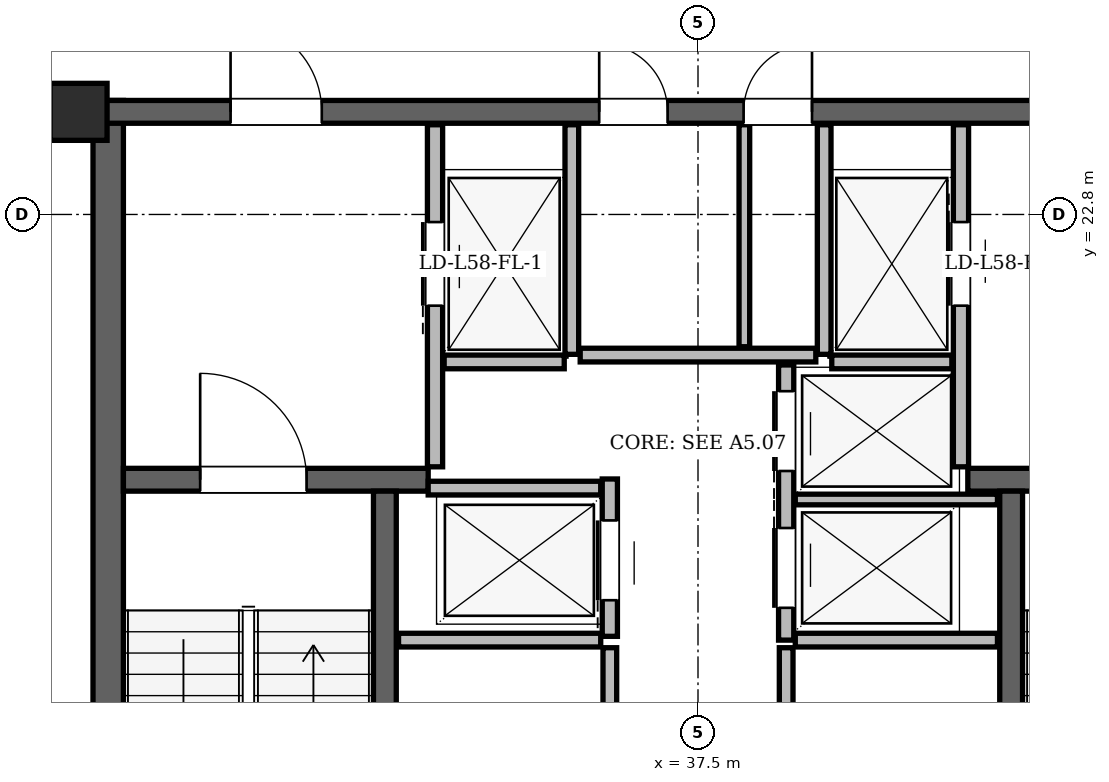
"""IFC4 building model, lengths in metres.
Left out: names, types, materials, properties, quantities, classifications, styles, units other than length and angle.
Written with IfcOpenShell. Run it as: python <this file> out.ifc"""

import sys

from ifc_helpers import new_model, si_unit, direction, frame, frame_2d, origin, origin_2d, place, context, subcontext, project, spatial, rectangle, hollow_rectangle, extrude, element, fill, save


model = new_model("IFC4")
c1 = context("Model", 3, precision=1e-05, world=origin(), true_north=direction((0.0, 1.0)))
c2 = subcontext(c1, "Body", "Model", "MODEL_VIEW")
j1 = project(units=[si_unit("LENGTHUNIT", "METRE"), si_unit("PLANEANGLEUNIT", "RADIAN")], contexts=[c1])
p1 = place(None, origin())
s1 = spatial("IfcSite", under=j1, at=p1, CompositionType="ELEMENT")
p2 = place(p1, origin())
s2 = spatial("IfcBuilding", under=s1, at=p2, CompositionType="ELEMENT")
p3 = place(p2, frame((0.0, 0.0, 219.9)))
s3 = spatial("IfcBuildingStorey", under=s2, at=p3, CompositionType="ELEMENT", Elevation=219.9)
p4 = place(p3, frame((29.35, 24.15, 0.0), z_axis=(0.0, 0.0, 1.0), x_axis=(1.0, 0.0, 0.0)))
e1 = element("IfcColumn", 1, at=p4, inside=s3, PredefinedType="COLUMN", context=c2, shape_type="SweptSolid", body=[
    extrude(hollow_rectangle(XDim=0.75, YDim=0.75, WallThickness=0.06, at=origin_2d()), origin(), (0.0, 0.0, 1.0), 3.6),
])
p5 = place(p3, frame((29.74, 11.0, 0.0), z_axis=(0.0, 0.0, 1.0), x_axis=(0.0, 1.0, 0.0)))
e2 = element("IfcWall", 2, at=p5, inside=s3, PredefinedType="SHEAR", context=c2, shape_type="SweptSolid", body=[
    extrude(rectangle(XDim=13.3, YDim=0.4, at=frame_2d((6.65, 0.0))), origin(), (0.0, 0.0, 1.0), 3.38),
])
p6 = place(p3, frame((29.65, 24.15, 0.0), z_axis=(0.0, 0.0, 1.0), x_axis=(1.0, 0.0, 0.0)))
e3 = element("IfcWall", 3, at=p6, inside=s3, PredefinedType="SHEAR", context=c2, shape_type="SweptSolid", body=[
    extrude(rectangle(XDim=15.7, YDim=0.3, at=frame_2d((7.85, 0.0))), origin(), (0.0, 0.0, 1.0), 3.38),
])
p7 = place(p6, frame((1.7, 0.0, 0.0)))
e4 = element("IfcOpeningElement", 4, at=p7, cuts=e3, PredefinedType="OPENING", context=c2, shape_type="SweptSolid", body=[
    extrude(rectangle(XDim=1.2, YDim=2.2, at=frame_2d((0.6, 1.1))), frame((0.0, 0.15, 0.0), z_axis=(0.0, -1.0, 0.0), x_axis=(1.0, 0.0, 0.0)), (0.0, 0.0, 1.0), 0.3),
])
p8 = place(p6, frame((12.8, 0.0, 0.0)))
e5 = element("IfcOpeningElement", 5, at=p8, cuts=e3, PredefinedType="OPENING", context=c2, shape_type="SweptSolid", body=[
    extrude(rectangle(XDim=1.2, YDim=2.2, at=frame_2d((0.6, 1.1))), frame((0.0, 0.15, 0.0), z_axis=(0.0, -1.0, 0.0), x_axis=(1.0, 0.0, 0.0)), (0.0, 0.0, 1.0), 0.3),
])
p9 = place(p6, frame((6.55, 0.0, 0.0)))
e6 = element("IfcOpeningElement", 6, at=p9, cuts=e3, PredefinedType="OPENING", context=c2, shape_type="SweptSolid", body=[
    extrude(rectangle(XDim=0.9, YDim=2.05, at=frame_2d((0.45, 1.025))), frame((0.0, 0.15, 0.0), z_axis=(0.0, -1.0, 0.0), x_axis=(1.0, 0.0, 0.0)), (0.0, 0.0, 1.0), 0.3),
])
p10 = place(p6, frame((8.45, 0.0, 0.0)))
e7 = element("IfcOpeningElement", 7, at=p10, cuts=e3, PredefinedType="OPENING", context=c2, shape_type="SweptSolid", body=[
    extrude(rectangle(XDim=0.9, YDim=2.05, at=frame_2d((0.45, 1.025))), frame((0.0, 0.15, 0.0), z_axis=(0.0, -1.0, 0.0), x_axis=(1.0, 0.0, 0.0)), (0.0, 0.0, 1.0), 0.3),
])
p11 = place(p3, frame((29.94, 19.31, 0.0), z_axis=(0.0, 0.0, 1.0), x_axis=(1.0, 0.0, 0.0)))
e8 = element("IfcWall", 8, at=p11, inside=s3, PredefinedType="SHEAR", context=c2, shape_type="SweptSolid", body=[
    extrude(rectangle(XDim=4.01, YDim=0.3, at=frame_2d((2.005, 0.0))), origin(), (0.0, 0.0, 1.0), 3.38),
])
p12 = place(p11, frame((1.01, 0.0, 0.0)))
e9 = element("IfcOpeningElement", 9, at=p12, cuts=e8, PredefinedType="OPENING", context=c2, shape_type="SweptSolid", body=[
    extrude(rectangle(XDim=1.4, YDim=2.2, at=frame_2d((0.7, 1.1))), frame((0.0, 0.15, 0.0), z_axis=(0.0, -1.0, 0.0), x_axis=(1.0, 0.0, 0.0)), (0.0, 0.0, 1.0), 0.3),
])
p13 = place(p3, frame((41.05, 19.31, 0.0), z_axis=(0.0, 0.0, 1.0), x_axis=(1.0, 0.0, 0.0)))
e10 = element("IfcWall", 10, at=p13, inside=s3, PredefinedType="SHEAR", context=c2, shape_type="SweptSolid", body=[
    extrude(rectangle(XDim=4.01, YDim=0.3, at=frame_2d((2.005, 0.0))), origin(), (0.0, 0.0, 1.0), 3.38),
])
p14 = place(p13, frame((1.6, 0.0, 0.0)))
e11 = element("IfcOpeningElement", 11, at=p14, cuts=e10, PredefinedType="OPENING", context=c2, shape_type="SweptSolid", body=[
    extrude(rectangle(XDim=1.4, YDim=2.2, at=frame_2d((0.7, 1.1))), frame((0.0, 0.15, 0.0), z_axis=(0.0, -1.0, 0.0), x_axis=(1.0, 0.0, 0.0)), (0.0, 0.0, 1.0), 0.3),
])
for number, where, z_axis, x_axis in (
    (12, (33.38, 11.54, 0.0), (0.0, 0.0, 1.0), (0.0, 1.0, 0.0)),
    (13, (41.62, 11.54, 0.0), (0.0, 0.0, 1.0), (0.0, 1.0, 0.0)),
):
    element("IfcWall", number, at=place(p3, frame(where, z_axis=z_axis, x_axis=x_axis)), inside=s3, PredefinedType="SHEAR", context=c2, shape_type="SweptSolid", body=[
        extrude(rectangle(XDim=7.62, YDim=0.3, at=frame_2d((3.81, 0.0))), origin(), (0.0, 0.0, 1.0), 3.38),
    ])
p15 = place(p3, frame((59.113, 11.428, 0.0), z_axis=(0.0, 0.0, 1.0), x_axis=(-0.499994551211, 0.866028549621, 0.0)))
e14 = element("IfcWall", 14, at=p15, inside=s3, PredefinedType="SOLIDWALL", context=c2, shape_type="SweptSolid", body=[
    extrude(rectangle(XDim=36.634, YDim=0.29, at=frame_2d((18.317, 0.0))), origin(), (0.0, 0.0, 1.0), 2.677),
])
p16 = place(p15, frame((3.429, 0.0, 0.0)))
e15 = element("IfcOpeningElement", 15, at=p16, cuts=e14, PredefinedType="OPENING", context=c2, shape_type="SweptSolid", body=[
    extrude(rectangle(XDim=1.5, YDim=2.2, at=frame_2d((0.75, 1.1))), frame((0.0, 0.145, 0.0), z_axis=(0.0, -1.0, 0.0), x_axis=(1.0, 0.0, 0.0)), (0.0, 0.0, 1.0), 0.29),
])
p17 = place(p15, frame((27.099, 0.0, 0.0)))
e16 = element("IfcOpeningElement", 16, at=p17, cuts=e14, PredefinedType="OPENING", context=c2, shape_type="SweptSolid", body=[
    extrude(rectangle(XDim=1.5, YDim=2.2, at=frame_2d((0.75, 1.1))), frame((0.0, 0.145, 0.0), z_axis=(0.0, -1.0, 0.0), x_axis=(1.0, 0.0, 0.0)), (0.0, 0.0, 1.0), 0.29),
])
p18 = place(p15, frame((7.895, 0.0, 0.85)))
e17 = element("IfcOpeningElement", 17, at=p18, cuts=e14, PredefinedType="OPENING", context=c2, shape_type="SweptSolid", body=[
    extrude(rectangle(XDim=1.2, YDim=1.48, at=frame_2d((0.6, 0.74))), frame((0.0, 0.145, 0.0), z_axis=(0.0, -1.0, 0.0), x_axis=(1.0, 0.0, 0.0)), (0.0, 0.0, 1.0), 0.29),
])
p19 = place(p15, frame((1.262, 0.0, 0.85)))
e18 = element("IfcOpeningElement", 18, at=p19, cuts=e14, PredefinedType="OPENING", context=c2, shape_type="SweptSolid", body=[
    extrude(rectangle(XDim=1.2, YDim=1.48, at=frame_2d((0.6, 0.74))), frame((0.0, 0.145, 0.0), z_axis=(0.0, -1.0, 0.0), x_axis=(1.0, 0.0, 0.0)), (0.0, 0.0, 1.0), 0.29),
])
p20 = place(p15, frame((12.216, 0.0, 0.85)))
e19 = element("IfcOpeningElement", 19, at=p20, cuts=e14, PredefinedType="OPENING", context=c2, shape_type="SweptSolid", body=[
    extrude(rectangle(XDim=2.0, YDim=1.717, at=frame_2d((1.0, 0.858))), frame((0.0, 0.145, 0.0), z_axis=(0.0, -1.0, 0.0), x_axis=(1.0, 0.0, 0.0)), (0.0, 0.0, 1.0), 0.29),
])
p21 = place(p15, frame((17.285, 0.0, 0.85)))
e20 = element("IfcOpeningElement", 20, at=p21, cuts=e14, PredefinedType="OPENING", context=c2, shape_type="SweptSolid", body=[
    extrude(rectangle(XDim=1.4, YDim=1.6, at=frame_2d((0.7, 0.8))), frame((0.0, 0.145, 0.0), z_axis=(0.0, -1.0, 0.0), x_axis=(1.0, 0.0, 0.0)), (0.0, 0.0, 1.0), 0.29),
])
p22 = place(p15, frame((20.673, 0.0, 0.85)))
e21 = element("IfcOpeningElement", 21, at=p22, cuts=e14, PredefinedType="OPENING", context=c2, shape_type="SweptSolid", body=[
    extrude(rectangle(XDim=1.2, YDim=1.48, at=frame_2d((0.6, 0.74))), frame((0.0, 0.145, 0.0), z_axis=(0.0, -1.0, 0.0), x_axis=(1.0, 0.0, 0.0)), (0.0, 0.0, 1.0), 0.29),
])
p23 = place(p15, frame((34.257, 0.0, 0.85)))
e22 = element("IfcOpeningElement", 22, at=p23, cuts=e14, PredefinedType="OPENING", context=c2, shape_type="SweptSolid", body=[
    extrude(rectangle(XDim=1.2, YDim=1.48, at=frame_2d((0.6, 0.74))), frame((0.0, 0.145, 0.0), z_axis=(0.0, -1.0, 0.0), x_axis=(1.0, 0.0, 0.0)), (0.0, 0.0, 1.0), 0.29),
])
p24 = place(p3, frame((34.203, 43.154, 0.0), z_axis=(0.0, 0.0, 1.0), x_axis=(-0.499994551211, -0.866028549621, 0.0)))
e23 = element("IfcWall", 23, at=p24, inside=s3, PredefinedType="SOLIDWALL", context=c2, shape_type="SweptSolid", body=[
    extrude(rectangle(XDim=36.634, YDim=0.29, at=frame_2d((18.317, 0.0))), origin(), (0.0, 0.0, 1.0), 2.677),
])
p25 = place(p24, frame((3.429, 0.0, 0.0)))
e24 = element("IfcOpeningElement", 24, at=p25, cuts=e23, PredefinedType="OPENING", context=c2, shape_type="SweptSolid", body=[
    extrude(rectangle(XDim=1.5, YDim=2.2, at=frame_2d((0.75, 1.1))), frame((0.0, 0.145, 0.0), z_axis=(0.0, -1.0, 0.0), x_axis=(1.0, 0.0, 0.0)), (0.0, 0.0, 1.0), 0.29),
])
p26 = place(p24, frame((27.099, 0.0, 0.0)))
e25 = element("IfcOpeningElement", 25, at=p26, cuts=e23, PredefinedType="OPENING", context=c2, shape_type="SweptSolid", body=[
    extrude(rectangle(XDim=1.5, YDim=2.2, at=frame_2d((0.75, 1.1))), frame((0.0, 0.145, 0.0), z_axis=(0.0, -1.0, 0.0), x_axis=(1.0, 0.0, 0.0)), (0.0, 0.0, 1.0), 0.29),
])
p27 = place(p24, frame((22.904, 0.0, 0.85)))
e26 = element("IfcOpeningElement", 26, at=p27, cuts=e23, PredefinedType="OPENING", context=c2, shape_type="SweptSolid", body=[
    extrude(rectangle(XDim=1.2, YDim=1.48, at=frame_2d((0.6, 0.74))), frame((0.0, 0.145, 0.0), z_axis=(0.0, -1.0, 0.0), x_axis=(1.0, 0.0, 0.0)), (0.0, 0.0, 1.0), 0.29),
])
p28 = place(p24, frame((33.102, 0.0, 0.85)))
e27 = element("IfcOpeningElement", 27, at=p28, cuts=e23, PredefinedType="OPENING", context=c2, shape_type="SweptSolid", body=[
    extrude(rectangle(XDim=1.2, YDim=1.48, at=frame_2d((0.6, 0.74))), frame((0.0, 0.145, 0.0), z_axis=(0.0, -1.0, 0.0), x_axis=(1.0, 0.0, 0.0)), (0.0, 0.0, 1.0), 0.29),
])
p29 = place(p24, frame((8.475, 0.0, 0.85)))
e28 = element("IfcOpeningElement", 28, at=p29, cuts=e23, PredefinedType="OPENING", context=c2, shape_type="SweptSolid", body=[
    extrude(rectangle(XDim=1.2, YDim=1.48, at=frame_2d((0.6, 0.74))), frame((0.0, 0.145, 0.0), z_axis=(0.0, -1.0, 0.0), x_axis=(1.0, 0.0, 0.0)), (0.0, 0.0, 1.0), 0.29),
])
p30 = place(p24, frame((15.529, 0.0, 0.85)))
e29 = element("IfcOpeningElement", 29, at=p30, cuts=e23, PredefinedType="OPENING", context=c2, shape_type="SweptSolid", body=[
    extrude(rectangle(XDim=2.8, YDim=1.717, at=frame_2d((1.4, 0.858))), frame((0.0, 0.145, 0.0), z_axis=(0.0, -1.0, 0.0), x_axis=(1.0, 0.0, 0.0)), (0.0, 0.0, 1.0), 0.29),
])
p31 = place(p24, frame((1.5, 0.0, 0.85)))
e30 = element("IfcOpeningElement", 30, at=p31, cuts=e23, PredefinedType="OPENING", context=c2, shape_type="SweptSolid", body=[
    extrude(rectangle(XDim=1.2, YDim=1.48, at=frame_2d((0.6, 0.74))), frame((0.0, 0.145, 0.0), z_axis=(0.0, -1.0, 0.0), x_axis=(1.0, 0.0, 0.0)), (0.0, 0.0, 1.0), 0.29),
])
p32 = place(p3, frame((34.04, 19.48, 0.0), z_axis=(0.0, 0.0, 1.0), x_axis=(0.0, 1.0, 0.0)))
e31 = element("IfcWall", 31, at=p32, inside=s3, PredefinedType="PARTITIONING", context=c2, shape_type="SweptSolid", body=[
    extrude(rectangle(XDim=4.5, YDim=0.2, at=frame_2d((2.25, 0.0))), origin(), (0.0, 0.0, 1.0), 3.38),
])
p33 = place(p32, frame((2.12, 0.0, 0.0)))
e32 = element("IfcOpeningElement", 32, at=p33, cuts=e31, PredefinedType="OPENING", context=c2, shape_type="SweptSolid", body=[
    extrude(rectangle(XDim=1.1, YDim=2.2, at=frame_2d((0.55, 1.1))), frame((0.0, 0.1, 0.0), z_axis=(0.0, -1.0, 0.0), x_axis=(1.0, 0.0, 0.0)), (0.0, 0.0, 1.0), 0.2),
])
p34 = place(p3, frame((35.84, 20.96, 0.0), z_axis=(0.0, 0.0, 1.0), x_axis=(0.0, 1.0, 0.0)))
e33 = element("IfcWall", 33, at=p34, inside=s3, PredefinedType="PARTITIONING", context=c2, shape_type="SweptSolid", body=[
    extrude(rectangle(XDim=3.02, YDim=0.18, at=frame_2d((1.51, 0.0))), origin(), (0.0, 0.0, 1.0), 3.38),
])
p35 = place(p3, frame((34.16, 20.86, 0.0), z_axis=(0.0, 0.0, 1.0), x_axis=(1.0, 0.0, 0.0)))
e34 = element("IfcWall", 34, at=p35, inside=s3, PredefinedType="PARTITIONING", context=c2, shape_type="SweptSolid", body=[
    extrude(rectangle(XDim=1.58, YDim=0.18, at=frame_2d((0.79, 0.0))), origin(), (0.0, 0.0, 1.0), 3.38),
])
p36 = place(p3, frame((40.96, 19.48, 0.0), z_axis=(0.0, 0.0, 1.0), x_axis=(0.0, 1.0, 0.0)))
e35 = element("IfcWall", 35, at=p36, inside=s3, PredefinedType="PARTITIONING", context=c2, shape_type="SweptSolid", body=[
    extrude(rectangle(XDim=4.5, YDim=0.2, at=frame_2d((2.25, 0.0))), origin(), (0.0, 0.0, 1.0), 3.38),
])
p37 = place(p36, frame((2.12, 0.0, 0.0)))
e36 = element("IfcOpeningElement", 36, at=p37, cuts=e35, PredefinedType="OPENING", context=c2, shape_type="SweptSolid", body=[
    extrude(rectangle(XDim=1.1, YDim=2.2, at=frame_2d((0.55, 1.1))), frame((0.0, 0.1, 0.0), z_axis=(0.0, -1.0, 0.0), x_axis=(1.0, 0.0, 0.0)), (0.0, 0.0, 1.0), 0.2),
])
p38 = place(p3, frame((39.16, 20.96, 0.0), z_axis=(0.0, 0.0, 1.0), x_axis=(0.0, 1.0, 0.0)))
e37 = element("IfcWall", 37, at=p38, inside=s3, PredefinedType="PARTITIONING", context=c2, shape_type="SweptSolid", body=[
    extrude(rectangle(XDim=3.02, YDim=0.18, at=frame_2d((1.51, 0.0))), origin(), (0.0, 0.0, 1.0), 3.38),
])
p39 = place(p3, frame((39.26, 20.86, 0.0), z_axis=(0.0, 0.0, 1.0), x_axis=(1.0, 0.0, 0.0)))
e38 = element("IfcWall", 38, at=p39, inside=s3, PredefinedType="PARTITIONING", context=c2, shape_type="SweptSolid", body=[
    extrude(rectangle(XDim=1.58, YDim=0.18, at=frame_2d((0.79, 0.0))), origin(), (0.0, 0.0, 1.0), 3.38),
])
p40 = place(p3, frame((36.34, 17.25, 0.0), z_axis=(0.0, 0.0, 1.0), x_axis=(0.0, 1.0, 0.0)))
e39 = element("IfcWall", 39, at=p40, inside=s3, PredefinedType="PARTITIONING", context=c2, shape_type="SweptSolid", body=[
    extrude(rectangle(XDim=2.07, YDim=0.2, at=frame_2d((1.035, 0.0))), origin(), (0.0, 0.0, 1.0), 3.38),
])
p41 = place(p40, frame((0.475, 0.0, 0.0)))
e40 = element("IfcOpeningElement", 40, at=p41, cuts=e39, PredefinedType="OPENING", context=c2, shape_type="SweptSolid", body=[
    extrude(rectangle(XDim=1.05, YDim=2.15, at=frame_2d((0.525, 1.075))), frame((0.0, 0.1, 0.0), z_axis=(0.0, -1.0, 0.0), x_axis=(1.0, 0.0, 0.0)), (0.0, 0.0, 1.0), 0.2),
])
p42 = place(p3, frame((33.95, 19.2, 0.0), z_axis=(0.0, 0.0, 1.0), x_axis=(1.0, 0.0, 0.0)))
e41 = element("IfcWall", 41, at=p42, inside=s3, PredefinedType="PARTITIONING", context=c2, shape_type="SweptSolid", body=[
    extrude(rectangle(XDim=2.27, YDim=0.18, at=frame_2d((1.135, 0.0))), origin(), (0.0, 0.0, 1.0), 3.38),
])
p43 = place(p3, frame((33.56, 17.2, 0.0), z_axis=(0.0, 0.0, 1.0), x_axis=(1.0, 0.0, 0.0)))
e42 = element("IfcWall", 42, at=p43, inside=s3, PredefinedType="PARTITIONING", context=c2, shape_type="SweptSolid", body=[
    extrude(rectangle(XDim=2.66, YDim=0.18, at=frame_2d((1.33, 0.0))), origin(), (0.0, 0.0, 1.0), 3.38),
])
p44 = place(p3, frame((36.34, 11.55, 0.0), z_axis=(0.0, 0.0, 1.0), x_axis=(0.0, 1.0, 0.0)))
e43 = element("IfcWall", 43, at=p44, inside=s3, PredefinedType="PARTITIONING", context=c2, shape_type="SweptSolid", body=[
    extrude(rectangle(XDim=5.55, YDim=0.18, at=frame_2d((2.775, 0.0))), origin(), (0.0, 0.0, 1.0), 3.38),
])
p45 = place(p44, frame((2.85, 0.0, 0.0)))
e44 = element("IfcOpeningElement", 44, at=p45, cuts=e43, PredefinedType="OPENING", context=c2, shape_type="SweptSolid", body=[
    extrude(rectangle(XDim=0.95, YDim=2.1, at=frame_2d((0.475, 1.05))), frame((0.0, 0.09, 0.0), z_axis=(0.0, -1.0, 0.0), x_axis=(1.0, 0.0, 0.0)), (0.0, 0.0, 1.0), 0.18),
])
p46 = place(p3, frame((38.66, 17.2, 0.0), z_axis=(0.0, 0.0, 1.0), x_axis=(0.0, 1.0, 0.0)))
e45 = element("IfcWall", 45, at=p46, inside=s3, PredefinedType="PARTITIONING", context=c2, shape_type="SweptSolid", body=[
    extrude(rectangle(XDim=3.62, YDim=0.2, at=frame_2d((1.81, 0.0))), origin(), (0.0, 0.0, 1.0), 3.38),
])
p47 = place(p46, frame((0.425, 0.0, 0.0)))
e46 = element("IfcOpeningElement", 46, at=p47, cuts=e45, PredefinedType="OPENING", context=c2, shape_type="SweptSolid", body=[
    extrude(rectangle(XDim=1.05, YDim=2.15, at=frame_2d((0.525, 1.075))), frame((0.0, 0.1, 0.0), z_axis=(0.0, -1.0, 0.0), x_axis=(1.0, 0.0, 0.0)), (0.0, 0.0, 1.0), 0.2),
])
p48 = place(p46, frame((2.225, 0.0, 0.0)))
e47 = element("IfcOpeningElement", 47, at=p48, cuts=e45, PredefinedType="OPENING", context=c2, shape_type="SweptSolid", body=[
    extrude(rectangle(XDim=1.05, YDim=2.15, at=frame_2d((0.525, 1.075))), frame((0.0, 0.1, 0.0), z_axis=(0.0, -1.0, 0.0), x_axis=(1.0, 0.0, 0.0)), (0.0, 0.0, 1.0), 0.2),
])
p49 = place(p3, frame((38.78, 17.2, 0.0), z_axis=(0.0, 0.0, 1.0), x_axis=(1.0, 0.0, 0.0)))
e48 = element("IfcWall", 48, at=p49, inside=s3, PredefinedType="PARTITIONING", context=c2, shape_type="SweptSolid", body=[
    extrude(rectangle(XDim=2.66, YDim=0.18, at=frame_2d((1.33, 0.0))), origin(), (0.0, 0.0, 1.0), 3.38),
])
p50 = place(p3, frame((38.78, 19.05, 0.0), z_axis=(0.0, 0.0, 1.0), x_axis=(1.0, 0.0, 0.0)))
e49 = element("IfcWall", 49, at=p50, inside=s3, PredefinedType="PARTITIONING", context=c2, shape_type="SweptSolid", body=[
    extrude(rectangle(XDim=2.66, YDim=0.14, at=frame_2d((1.33, 0.0))), origin(), (0.0, 0.0, 1.0), 3.38),
])
p51 = place(p3, frame((38.66, 11.55, 0.0), z_axis=(0.0, 0.0, 1.0), x_axis=(0.0, 1.0, 0.0)))
e50 = element("IfcWall", 50, at=p51, inside=s3, PredefinedType="PARTITIONING", context=c2, shape_type="SweptSolid", body=[
    extrude(rectangle(XDim=5.55, YDim=0.18, at=frame_2d((2.775, 0.0))), origin(), (0.0, 0.0, 1.0), 3.38),
])
p52 = place(p51, frame((3.15, 0.0, 0.0)))
e51 = element("IfcOpeningElement", 51, at=p52, cuts=e50, PredefinedType="OPENING", context=c2, shape_type="SweptSolid", body=[
    extrude(rectangle(XDim=0.95, YDim=2.1, at=frame_2d((0.475, 1.05))), frame((0.0, 0.09, 0.0), z_axis=(0.0, -1.0, 0.0), x_axis=(1.0, 0.0, 0.0)), (0.0, 0.0, 1.0), 0.18),
])
p53 = place(p3, frame((35.95, 20.95, 0.0), z_axis=(0.0, 0.0, 1.0), x_axis=(1.0, 0.0, 0.0)))
e52 = element("IfcWall", 52, at=p53, inside=s3, PredefinedType="PARTITIONING", context=c2, shape_type="SweptSolid", body=[
    extrude(rectangle(XDim=3.1, YDim=0.18, at=frame_2d((1.55, 0.0))), origin(), (0.0, 0.0, 1.0), 3.38),
])
p54 = place(p3, frame((38.11, 21.06, 0.0), z_axis=(0.0, 0.0, 1.0), x_axis=(0.0, 1.0, 0.0)))
e53 = element("IfcWall", 53, at=p54, inside=s3, PredefinedType="PARTITIONING", context=c2, shape_type="SweptSolid", body=[
    extrude(rectangle(XDim=2.92, YDim=0.14, at=frame_2d((1.46, 0.0))), origin(), (0.0, 0.0, 1.0), 3.38),
])
p55 = place(p33, origin())
e54 = element("IfcDoor", 54, at=p55, inside=s3, OperationType="SLIDING_TO_LEFT", PredefinedType="DOOR", context=c2, shape_type="SweptSolid", body=[
    extrude(rectangle(XDim=1.1, YDim=2.2, at=frame_2d((0.55, 1.1))), frame((0.0, 0.025, 0.0), z_axis=(0.0, -1.0, 0.0), x_axis=(1.0, 0.0, 0.0)), (0.0, 0.0, 1.0), 0.05),
])
fill(e32, e54)
p56 = place(p37, origin())
e55 = element("IfcDoor", 55, at=p56, inside=s3, OperationType="SLIDING_TO_RIGHT", PredefinedType="DOOR", context=c2, shape_type="SweptSolid", body=[
    extrude(rectangle(XDim=1.1, YDim=2.2, at=frame_2d((0.55, 1.1))), frame((0.0, 0.025, 0.0), z_axis=(0.0, -1.0, 0.0), x_axis=(1.0, 0.0, 0.0)), (0.0, 0.0, 1.0), 0.05),
])
fill(e36, e55)
p57 = place(p41, origin())
e56 = element("IfcDoor", 56, at=p57, inside=s3, OperationType="SLIDING_TO_LEFT", PredefinedType="DOOR", context=c2, shape_type="SweptSolid", body=[
    extrude(rectangle(XDim=1.05, YDim=2.15, at=frame_2d((0.525, 1.075))), frame((0.0, 0.025, 0.0), z_axis=(0.0, -1.0, 0.0), x_axis=(1.0, 0.0, 0.0)), (0.0, 0.0, 1.0), 0.05),
])
fill(e40, e56)
p58 = place(p47, origin())
e57 = element("IfcDoor", 57, at=p58, inside=s3, OperationType="SLIDING_TO_RIGHT", PredefinedType="DOOR", context=c2, shape_type="SweptSolid", body=[
    extrude(rectangle(XDim=1.05, YDim=2.15, at=frame_2d((0.525, 1.075))), frame((0.0, 0.025, 0.0), z_axis=(0.0, -1.0, 0.0), x_axis=(1.0, 0.0, 0.0)), (0.0, 0.0, 1.0), 0.05),
])
fill(e46, e57)
p59 = place(p48, origin())
e58 = element("IfcDoor", 58, at=p59, inside=s3, OperationType="SLIDING_TO_LEFT", PredefinedType="DOOR", context=c2, shape_type="SweptSolid", body=[
    extrude(rectangle(XDim=1.05, YDim=2.15, at=frame_2d((0.525, 1.075))), frame((0.0, 0.025, 0.0), z_axis=(0.0, -1.0, 0.0), x_axis=(1.0, 0.0, 0.0)), (0.0, 0.0, 1.0), 0.05),
])
fill(e47, e58)
p60 = place(p12, origin())
e59 = element("IfcDoor", 59, at=p60, inside=s3, OperationType="SINGLE_SWING_LEFT", PredefinedType="DOOR", context=c2, shape_type="SweptSolid", body=[
    extrude(rectangle(XDim=1.4, YDim=2.2, at=frame_2d((0.7, 1.1))), frame((0.0, 0.025, 0.0), z_axis=(0.0, -1.0, 0.0), x_axis=(1.0, 0.0, 0.0)), (0.0, 0.0, 1.0), 0.05),
])
fill(e9, e59)
p61 = place(p7, origin())
e60 = element("IfcDoor", 60, at=p61, inside=s3, OperationType="SINGLE_SWING_LEFT", PredefinedType="DOOR", context=c2, shape_type="SweptSolid", body=[
    extrude(rectangle(XDim=1.2, YDim=2.2, at=frame_2d((0.6, 1.1))), frame((0.0, 0.025, 0.0), z_axis=(0.0, -1.0, 0.0), x_axis=(1.0, 0.0, 0.0)), (0.0, 0.0, 1.0), 0.05),
])
fill(e4, e60)
p62 = place(p9, origin())
e61 = element("IfcDoor", 61, at=p62, inside=s3, OperationType="SINGLE_SWING_LEFT", PredefinedType="DOOR", context=c2, shape_type="SweptSolid", body=[
    extrude(rectangle(XDim=0.9, YDim=2.05, at=frame_2d((0.45, 1.025))), frame((0.0, 0.025, 0.0), z_axis=(0.0, -1.0, 0.0), x_axis=(1.0, 0.0, 0.0)), (0.0, 0.0, 1.0), 0.05),
])
fill(e6, e61)
p63 = place(p10, origin())
e62 = element("IfcDoor", 62, at=p63, inside=s3, OperationType="SINGLE_SWING_RIGHT", PredefinedType="DOOR", context=c2, shape_type="SweptSolid", body=[
    extrude(rectangle(XDim=0.9, YDim=2.05, at=frame_2d((0.45, 1.025))), frame((0.0, 0.025, 0.0), z_axis=(0.0, -1.0, 0.0), x_axis=(1.0, 0.0, 0.0)), (0.0, 0.0, 1.0), 0.05),
])
fill(e7, e62)
save(model, sys.argv[1])
